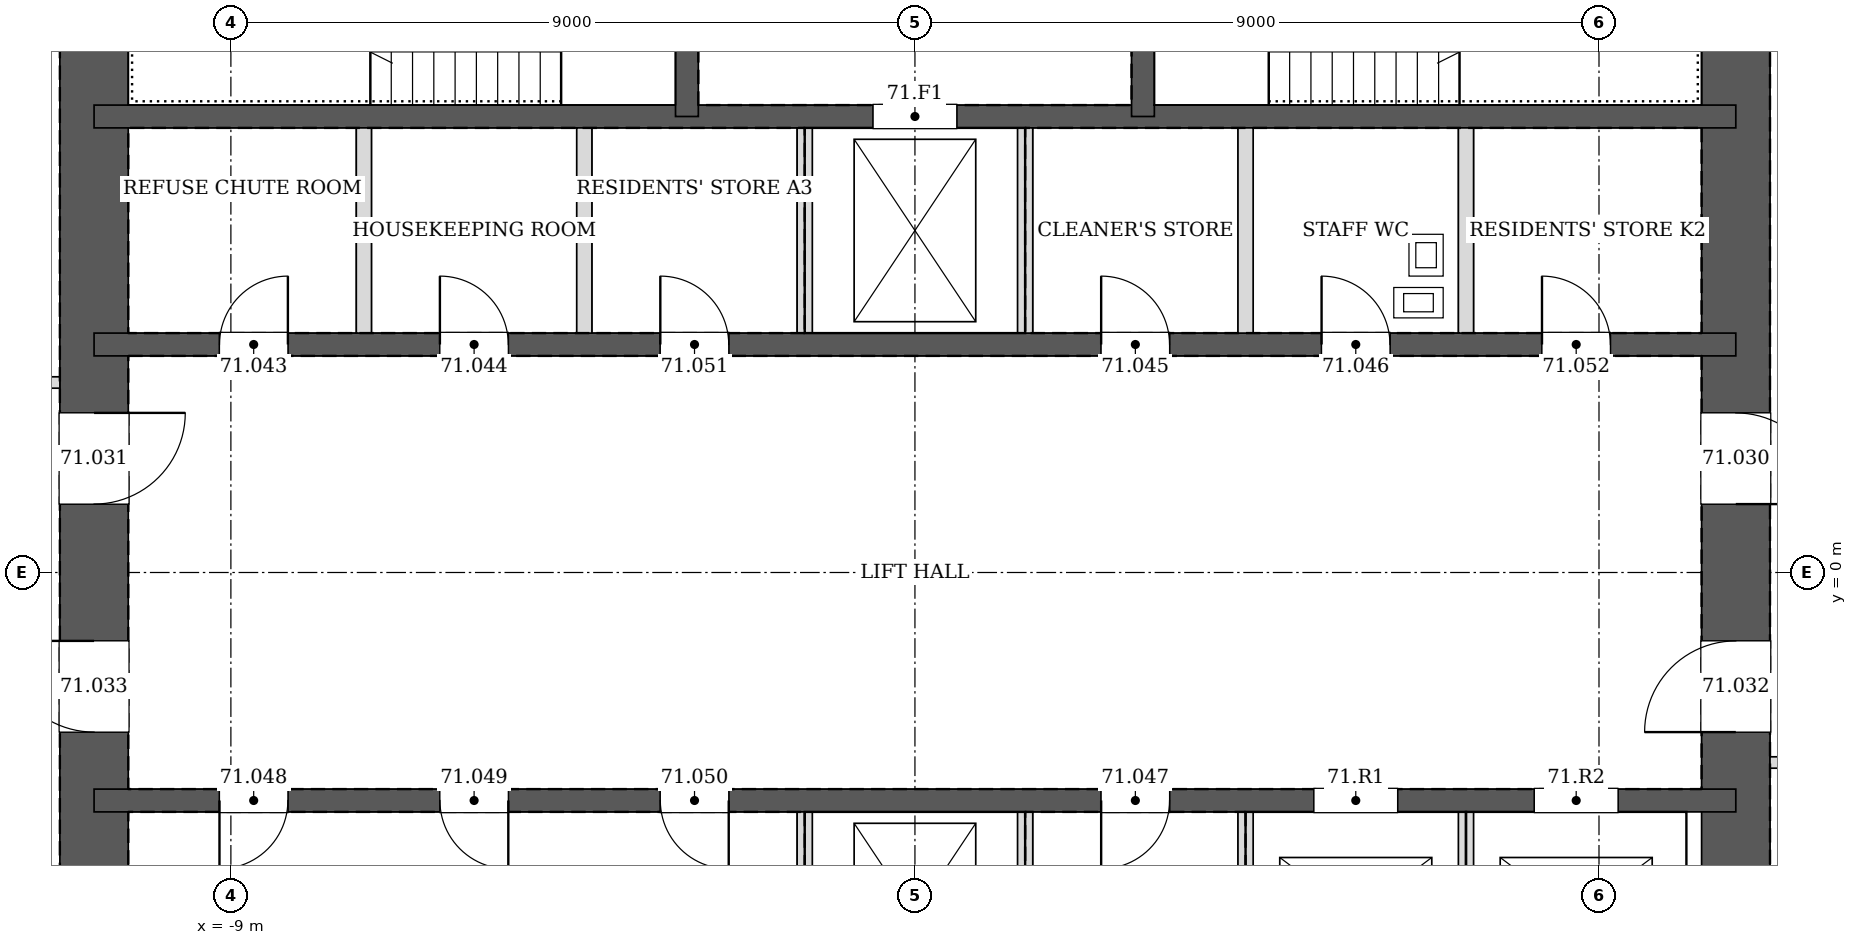
"""IFC4 building model, lengths in metres.
Left out: names, types, materials, properties, quantities, classifications, styles, units other than length and angle.
Written with IfcOpenShell. Run it as: python <this file> out.ifc"""

import sys

from ifc_helpers import new_model, si_unit, direction, frame, frame_2d, origin, place, context, subcontext, project, spatial, rectangle, extrude, element, fill, save


model = new_model("IFC4")
c1 = context("Model", 3, precision=1e-05, world=origin(), true_north=direction((0.0, 1.0)))
c2 = subcontext(c1, "Body", "Model", "MODEL_VIEW")
j1 = project(units=[si_unit("LENGTHUNIT", "METRE"), si_unit("PLANEANGLEUNIT", "RADIAN")], contexts=[c1])
p1 = place(None, origin())
s1 = spatial("IfcSite", under=j1, at=p1, CompositionType="ELEMENT")
p2 = place(p1, origin())
s2 = spatial("IfcBuilding", under=s1, at=p2, CompositionType="ELEMENT")
p3 = place(p2, frame((0.0, 0.0, 291.2)))
s3 = spatial("IfcBuildingStorey", under=s2, at=p3, CompositionType="ELEMENT", Elevation=291.2)
p4 = place(p3, frame((10.8, -10.8, 0.0), z_axis=(0.0, 0.0, 1.0), x_axis=(0.0, 1.0, 0.0)))
e1 = element("IfcWall", 1, at=p4, inside=s3, PredefinedType="SOLIDWALL", context=c2, shape_type="SweptSolid", body=[
    extrude(rectangle(XDim=21.6, YDim=0.9, at=frame_2d((10.8, 0.0))), origin(), (0.0, 0.0, 1.0), 3.4),
])
p5 = place(p4, frame((11.7, 0.0, 0.0)))
e2 = element("IfcOpeningElement", 2, at=p5, cuts=e1, PredefinedType="OPENING", context=c2, shape_type="SweptSolid", body=[
    extrude(rectangle(XDim=1.2, YDim=2.1, at=frame_2d((0.6, 1.05))), frame((0.0, 0.46, 0.0), z_axis=(0.0, -1.0, 0.0), x_axis=(1.0, 0.0, 0.0)), (0.0, 0.0, 1.0), 0.92),
])
p6 = place(p4, frame((8.7, 0.0, 0.0)))
e3 = element("IfcOpeningElement", 3, at=p6, cuts=e1, PredefinedType="OPENING", context=c2, shape_type="SweptSolid", body=[
    extrude(rectangle(XDim=1.2, YDim=2.1, at=frame_2d((0.6, 1.05))), frame((0.0, 0.46, 0.0), z_axis=(0.0, -1.0, 0.0), x_axis=(1.0, 0.0, 0.0)), (0.0, 0.0, 1.0), 0.92),
])
p7 = place(p3, frame((-10.8, 10.8, 0.0), z_axis=(0.0, 0.0, 1.0), x_axis=(0.0, -1.0, 0.0)))
e4 = element("IfcWall", 4, at=p7, inside=s3, PredefinedType="SOLIDWALL", context=c2, shape_type="SweptSolid", body=[
    extrude(rectangle(XDim=21.6, YDim=0.9, at=frame_2d((10.8, 0.0))), origin(), (0.0, 0.0, 1.0), 3.4),
])
p8 = place(p7, frame((8.7, 0.0, 0.0)))
e5 = element("IfcOpeningElement", 5, at=p8, cuts=e4, PredefinedType="OPENING", context=c2, shape_type="SweptSolid", body=[
    extrude(rectangle(XDim=1.2, YDim=2.1, at=frame_2d((0.6, 1.05))), frame((0.0, 0.46, 0.0), z_axis=(0.0, -1.0, 0.0), x_axis=(1.0, 0.0, 0.0)), (0.0, 0.0, 1.0), 0.92),
])
p9 = place(p7, frame((11.7, 0.0, 0.0)))
e6 = element("IfcOpeningElement", 6, at=p9, cuts=e4, PredefinedType="OPENING", context=c2, shape_type="SweptSolid", body=[
    extrude(rectangle(XDim=1.2, YDim=2.1, at=frame_2d((0.6, 1.05))), frame((0.0, 0.46, 0.0), z_axis=(0.0, -1.0, 0.0), x_axis=(1.0, 0.0, 0.0)), (0.0, 0.0, 1.0), 0.92),
])
p10 = place(p3, frame((-10.8, 3.0, 0.0), z_axis=(0.0, 0.0, 1.0), x_axis=(1.0, 0.0, 0.0)))
e7 = element("IfcWall", 7, at=p10, inside=s3, PredefinedType="SOLIDWALL", context=c2, shape_type="SweptSolid", body=[
    extrude(rectangle(XDim=21.6, YDim=0.3, at=frame_2d((10.8, 0.0))), origin(), (0.0, 0.0, 1.0), 3.4),
])
p11 = place(p10, frame((1.65, 0.0, 0.0)))
e8 = element("IfcOpeningElement", 8, at=p11, cuts=e7, PredefinedType="OPENING", context=c2, shape_type="SweptSolid", body=[
    extrude(rectangle(XDim=0.9, YDim=2.1, at=frame_2d((0.45, 1.05))), frame((0.0, 0.16, 0.0), z_axis=(0.0, -1.0, 0.0), x_axis=(1.0, 0.0, 0.0)), (0.0, 0.0, 1.0), 0.32),
])
p12 = place(p10, frame((4.55, 0.0, 0.0)))
e9 = element("IfcOpeningElement", 9, at=p12, cuts=e7, PredefinedType="OPENING", context=c2, shape_type="SweptSolid", body=[
    extrude(rectangle(XDim=0.9, YDim=2.1, at=frame_2d((0.45, 1.05))), frame((0.0, 0.16, 0.0), z_axis=(0.0, -1.0, 0.0), x_axis=(1.0, 0.0, 0.0)), (0.0, 0.0, 1.0), 0.32),
])
p13 = place(p10, frame((13.25, 0.0, 0.0)))
e10 = element("IfcOpeningElement", 10, at=p13, cuts=e7, PredefinedType="OPENING", context=c2, shape_type="SweptSolid", body=[
    extrude(rectangle(XDim=0.9, YDim=2.1, at=frame_2d((0.45, 1.05))), frame((0.0, 0.16, 0.0), z_axis=(0.0, -1.0, 0.0), x_axis=(1.0, 0.0, 0.0)), (0.0, 0.0, 1.0), 0.32),
])
p14 = place(p10, frame((16.15, 0.0, 0.0)))
e11 = element("IfcOpeningElement", 11, at=p14, cuts=e7, PredefinedType="OPENING", context=c2, shape_type="SweptSolid", body=[
    extrude(rectangle(XDim=0.9, YDim=2.1, at=frame_2d((0.45, 1.05))), frame((0.0, 0.16, 0.0), z_axis=(0.0, -1.0, 0.0), x_axis=(1.0, 0.0, 0.0)), (0.0, 0.0, 1.0), 0.32),
])
p15 = place(p10, frame((7.45, 0.0, 0.0)))
e12 = element("IfcOpeningElement", 12, at=p15, cuts=e7, PredefinedType="OPENING", context=c2, shape_type="SweptSolid", body=[
    extrude(rectangle(XDim=0.9, YDim=2.1, at=frame_2d((0.45, 1.05))), frame((0.0, 0.16, 0.0), z_axis=(0.0, -1.0, 0.0), x_axis=(1.0, 0.0, 0.0)), (0.0, 0.0, 1.0), 0.32),
])
p16 = place(p10, frame((19.05, 0.0, 0.0)))
e13 = element("IfcOpeningElement", 13, at=p16, cuts=e7, PredefinedType="OPENING", context=c2, shape_type="SweptSolid", body=[
    extrude(rectangle(XDim=0.9, YDim=2.1, at=frame_2d((0.45, 1.05))), frame((0.0, 0.16, 0.0), z_axis=(0.0, -1.0, 0.0), x_axis=(1.0, 0.0, 0.0)), (0.0, 0.0, 1.0), 0.32),
])
p17 = place(p3, frame((-10.8, 6.0, 0.0), z_axis=(0.0, 0.0, 1.0), x_axis=(1.0, 0.0, 0.0)))
e14 = element("IfcWall", 14, at=p17, inside=s3, PredefinedType="SOLIDWALL", context=c2, shape_type="SweptSolid", body=[
    extrude(rectangle(XDim=21.6, YDim=0.3, at=frame_2d((10.8, 0.0))), origin(), (0.0, 0.0, 1.0), 3.4),
])
p18 = place(p17, frame((10.25, 0.0, 0.0)))
e15 = element("IfcOpeningElement", 15, at=p18, cuts=e14, PredefinedType="OPENING", context=c2, shape_type="SweptSolid", body=[
    extrude(rectangle(XDim=1.1, YDim=2.1, at=frame_2d((0.55, 1.05))), frame((0.0, 0.16, 0.0), z_axis=(0.0, -1.0, 0.0), x_axis=(1.0, 0.0, 0.0)), (0.0, 0.0, 1.0), 0.32),
])
p19 = place(p3, frame((-3.0, 6.0, 0.0), z_axis=(0.0, 0.0, 1.0), x_axis=(0.0, 1.0, 0.0)))
e16 = element("IfcWall", 16, at=p19, inside=s3, PredefinedType="SOLIDWALL", context=c2, shape_type="SweptSolid", body=[
    extrude(rectangle(XDim=4.8, YDim=0.3, at=frame_2d((2.4, 0.0))), origin(), (0.0, 0.0, 1.0), 3.4),
])
p20 = place(p19, frame((1.75, 0.0, 0.0)))
e17 = element("IfcOpeningElement", 17, at=p20, cuts=e16, PredefinedType="OPENING", context=c2, shape_type="SweptSolid", body=[
    extrude(rectangle(XDim=1.0, YDim=2.1, at=frame_2d((0.5, 1.05))), frame((0.0, 0.16, 0.0), z_axis=(0.0, -1.0, 0.0), x_axis=(1.0, 0.0, 0.0)), (0.0, 0.0, 1.0), 0.32),
])
p21 = place(p3, frame((3.0, 6.0, 0.0), z_axis=(0.0, 0.0, 1.0), x_axis=(0.0, 1.0, 0.0)))
e18 = element("IfcWall", 18, at=p21, inside=s3, PredefinedType="SOLIDWALL", context=c2, shape_type="SweptSolid", body=[
    extrude(rectangle(XDim=4.8, YDim=0.3, at=frame_2d((2.4, 0.0))), origin(), (0.0, 0.0, 1.0), 3.4),
])
p22 = place(p21, frame((1.75, 0.0, 0.0)))
e19 = element("IfcOpeningElement", 19, at=p22, cuts=e18, PredefinedType="OPENING", context=c2, shape_type="SweptSolid", body=[
    extrude(rectangle(XDim=1.0, YDim=2.1, at=frame_2d((0.5, 1.05))), frame((0.0, 0.16, 0.0), z_axis=(0.0, -1.0, 0.0), x_axis=(1.0, 0.0, 0.0)), (0.0, 0.0, 1.0), 0.32),
])
p23 = place(p3, frame((-10.8, -3.0, 0.0), z_axis=(0.0, 0.0, 1.0), x_axis=(1.0, 0.0, 0.0)))
e20 = element("IfcWall", 20, at=p23, inside=s3, PredefinedType="SOLIDWALL", context=c2, shape_type="SweptSolid", body=[
    extrude(rectangle(XDim=21.6, YDim=0.3, at=frame_2d((10.8, 0.0))), origin(), (0.0, 0.0, 1.0), 3.4),
])
p24 = place(p23, frame((13.25, 0.0, 0.0)))
e21 = element("IfcOpeningElement", 21, at=p24, cuts=e20, PredefinedType="OPENING", context=c2, shape_type="SweptSolid", body=[
    extrude(rectangle(XDim=0.9, YDim=2.1, at=frame_2d((0.45, 1.05))), frame((0.0, 0.16, 0.0), z_axis=(0.0, -1.0, 0.0), x_axis=(1.0, 0.0, 0.0)), (0.0, 0.0, 1.0), 0.32),
])
p25 = place(p23, frame((1.65, 0.0, 0.0)))
e22 = element("IfcOpeningElement", 22, at=p25, cuts=e20, PredefinedType="OPENING", context=c2, shape_type="SweptSolid", body=[
    extrude(rectangle(XDim=0.9, YDim=2.1, at=frame_2d((0.45, 1.05))), frame((0.0, 0.16, 0.0), z_axis=(0.0, -1.0, 0.0), x_axis=(1.0, 0.0, 0.0)), (0.0, 0.0, 1.0), 0.32),
])
p26 = place(p23, frame((4.55, 0.0, 0.0)))
e23 = element("IfcOpeningElement", 23, at=p26, cuts=e20, PredefinedType="OPENING", context=c2, shape_type="SweptSolid", body=[
    extrude(rectangle(XDim=0.9, YDim=2.1, at=frame_2d((0.45, 1.05))), frame((0.0, 0.16, 0.0), z_axis=(0.0, -1.0, 0.0), x_axis=(1.0, 0.0, 0.0)), (0.0, 0.0, 1.0), 0.32),
])
p27 = place(p23, frame((7.45, 0.0, 0.0)))
e24 = element("IfcOpeningElement", 24, at=p27, cuts=e20, PredefinedType="OPENING", context=c2, shape_type="SweptSolid", body=[
    extrude(rectangle(XDim=0.9, YDim=2.1, at=frame_2d((0.45, 1.05))), frame((0.0, 0.16, 0.0), z_axis=(0.0, -1.0, 0.0), x_axis=(1.0, 0.0, 0.0)), (0.0, 0.0, 1.0), 0.32),
])
p28 = place(p23, frame((16.05, 0.0, 0.0)))
e25 = element("IfcOpeningElement", 25, at=p28, cuts=e20, PredefinedType="OPENING", context=c2, shape_type="SweptSolid", body=[
    extrude(rectangle(XDim=1.1, YDim=2.1, at=frame_2d((0.55, 1.05))), frame((0.0, 0.16, 0.0), z_axis=(0.0, -1.0, 0.0), x_axis=(1.0, 0.0, 0.0)), (0.0, 0.0, 1.0), 0.32),
])
p29 = place(p23, frame((18.95, 0.0, 0.0)))
e26 = element("IfcOpeningElement", 26, at=p29, cuts=e20, PredefinedType="OPENING", context=c2, shape_type="SweptSolid", body=[
    extrude(rectangle(XDim=1.1, YDim=2.1, at=frame_2d((0.55, 1.05))), frame((0.0, 0.16, 0.0), z_axis=(0.0, -1.0, 0.0), x_axis=(1.0, 0.0, 0.0)), (0.0, 0.0, 1.0), 0.32),
])
p30 = place(p3, frame((11.25, -2.5, 0.0), z_axis=(0.0, 0.0, 1.0), x_axis=(1.0, 0.0, 0.0)))
e27 = element("IfcWall", 27, at=p30, inside=s3, PredefinedType="PARTITIONING", context=c2, shape_type="SweptSolid", body=[
    extrude(rectangle(XDim=1.65, YDim=0.15, at=frame_2d((0.825, 0.0))), origin(), (0.0, 0.0, 1.0), 3.2),
])
p31 = place(p30, frame((0.35, 0.0, 0.0)))
e28 = element("IfcOpeningElement", 28, at=p31, cuts=e27, PredefinedType="OPENING", context=c2, shape_type="SweptSolid", body=[
    extrude(rectangle(XDim=0.95, YDim=2.1, at=frame_2d((0.475, 1.05))), frame((0.0, 0.085, 0.0), z_axis=(0.0, -1.0, 0.0), x_axis=(1.0, 0.0, 0.0)), (0.0, 0.0, 1.0), 0.17),
])
p32 = place(p3, frame((-11.25, 2.5, 0.0), z_axis=(0.0, 0.0, 1.0), x_axis=(-1.0, 0.0, 0.0)))
e29 = element("IfcWall", 29, at=p32, inside=s3, PredefinedType="PARTITIONING", context=c2, shape_type="SweptSolid", body=[
    extrude(rectangle(XDim=1.65, YDim=0.15, at=frame_2d((0.825, 0.0))), origin(), (0.0, 0.0, 1.0), 3.2),
])
p33 = place(p32, frame((0.35, 0.0, 0.0)))
e30 = element("IfcOpeningElement", 30, at=p33, cuts=e29, PredefinedType="OPENING", context=c2, shape_type="SweptSolid", body=[
    extrude(rectangle(XDim=0.95, YDim=2.1, at=frame_2d((0.475, 1.05))), frame((0.0, 0.085, 0.0), z_axis=(0.0, -1.0, 0.0), x_axis=(1.0, 0.0, 0.0)), (0.0, 0.0, 1.0), 0.17),
])
for number, where, z_axis, x_axis in (
    (31, (-7.25, 3.15, 0.0), (0.0, 0.0, 1.0), (0.0, 1.0, 0.0)),
    (32, (-4.35, 3.15, 0.0), (0.0, 0.0, 1.0), (0.0, 1.0, 0.0)),
    (33, (-1.45, 3.15, 0.0), (0.0, 0.0, 1.0), (0.0, 1.0, 0.0)),
    (34, (1.45, 3.15, 0.0), (0.0, 0.0, 1.0), (0.0, 1.0, 0.0)),
    (35, (4.35, 3.15, 0.0), (0.0, 0.0, 1.0), (0.0, 1.0, 0.0)),
    (36, (7.25, 3.15, 0.0), (0.0, 0.0, 1.0), (0.0, 1.0, 0.0)),
    (37, (-1.45, -5.85, 0.0), (0.0, 0.0, 1.0), (0.0, 1.0, 0.0)),
    (38, (1.45, -5.85, 0.0), (0.0, 0.0, 1.0), (0.0, 1.0, 0.0)),
    (39, (4.35, -5.85, 0.0), (0.0, 0.0, 1.0), (0.0, 1.0, 0.0)),
):
    element("IfcWall", number, at=place(p3, frame(where, z_axis=z_axis, x_axis=x_axis)), inside=s3, PredefinedType="PARTITIONING", context=c2, shape_type="SweptSolid", body=[
        extrude(rectangle(XDim=2.7, YDim=0.2, at=frame_2d((1.35, 0.0))), origin(), (0.0, 0.0, 1.0), 3.2),
    ])
p34 = place(p3, frame((7.25, -5.85, 0.0), z_axis=(0.0, 0.0, 1.0), x_axis=(0.0, 1.0, 0.0)))
e40 = element("IfcWall", 40, at=p34, inside=s3, PredefinedType="PARTITIONING", context=c2, shape_type="SweptSolid", body=[
    extrude(rectangle(XDim=2.7, YDim=0.2, at=frame_2d((1.35, 0.0))), origin(), (0.0, 0.0, 1.0), 3.4),
])
p35 = place(p5, frame((1.2, 0.0, 0.0), z_axis=(0.0, 0.0, 1.0), x_axis=(-1.0, 0.0, 0.0)))
e41 = element("IfcDoor", 41, at=p35, inside=s3, OperationType="SINGLE_SWING_RIGHT", PredefinedType="DOOR", context=c2, shape_type="SweptSolid", body=[
    extrude(rectangle(XDim=1.2, YDim=2.1, at=frame_2d((0.6, 1.05))), frame((0.0, 0.025, 0.0), z_axis=(0.0, -1.0, 0.0), x_axis=(1.0, 0.0, 0.0)), (0.0, 0.0, 1.0), 0.05),
])
fill(e2, e41)
p36 = place(p8, origin())
e42 = element("IfcDoor", 42, at=p36, inside=s3, OperationType="SINGLE_SWING_LEFT", PredefinedType="DOOR", context=c2, shape_type="SweptSolid", body=[
    extrude(rectangle(XDim=1.2, YDim=2.1, at=frame_2d((0.6, 1.05))), frame((0.0, 0.025, 0.0), z_axis=(0.0, -1.0, 0.0), x_axis=(1.0, 0.0, 0.0)), (0.0, 0.0, 1.0), 0.05),
])
fill(e5, e42)
p37 = place(p6, origin())
e43 = element("IfcDoor", 43, at=p37, inside=s3, OperationType="SINGLE_SWING_LEFT", PredefinedType="DOOR", context=c2, shape_type="SweptSolid", body=[
    extrude(rectangle(XDim=1.2, YDim=2.1, at=frame_2d((0.6, 1.05))), frame((0.0, 0.025, 0.0), z_axis=(0.0, -1.0, 0.0), x_axis=(1.0, 0.0, 0.0)), (0.0, 0.0, 1.0), 0.05),
])
fill(e3, e43)
p38 = place(p9, frame((1.2, 0.0, 0.0), z_axis=(0.0, 0.0, 1.0), x_axis=(-1.0, 0.0, 0.0)))
e44 = element("IfcDoor", 44, at=p38, inside=s3, OperationType="SINGLE_SWING_RIGHT", PredefinedType="DOOR", context=c2, shape_type="SweptSolid", body=[
    extrude(rectangle(XDim=1.2, YDim=2.1, at=frame_2d((0.6, 1.05))), frame((0.0, 0.025, 0.0), z_axis=(0.0, -1.0, 0.0), x_axis=(1.0, 0.0, 0.0)), (0.0, 0.0, 1.0), 0.05),
])
fill(e6, e44)
p39 = place(p11, origin())
e45 = element("IfcDoor", 45, at=p39, inside=s3, OperationType="SINGLE_SWING_RIGHT", PredefinedType="DOOR", context=c2, shape_type="SweptSolid", body=[
    extrude(rectangle(XDim=0.9, YDim=2.1, at=frame_2d((0.45, 1.05))), frame((0.0, 0.025, 0.0), z_axis=(0.0, -1.0, 0.0), x_axis=(1.0, 0.0, 0.0)), (0.0, 0.0, 1.0), 0.05),
])
fill(e8, e45)
p40 = place(p12, origin())
e46 = element("IfcDoor", 46, at=p40, inside=s3, OperationType="SINGLE_SWING_LEFT", PredefinedType="DOOR", context=c2, shape_type="SweptSolid", body=[
    extrude(rectangle(XDim=0.9, YDim=2.1, at=frame_2d((0.45, 1.05))), frame((0.0, 0.025, 0.0), z_axis=(0.0, -1.0, 0.0), x_axis=(1.0, 0.0, 0.0)), (0.0, 0.0, 1.0), 0.05),
])
fill(e9, e46)
p41 = place(p13, origin())
e47 = element("IfcDoor", 47, at=p41, inside=s3, OperationType="SINGLE_SWING_LEFT", PredefinedType="DOOR", context=c2, shape_type="SweptSolid", body=[
    extrude(rectangle(XDim=0.9, YDim=2.1, at=frame_2d((0.45, 1.05))), frame((0.0, 0.025, 0.0), z_axis=(0.0, -1.0, 0.0), x_axis=(1.0, 0.0, 0.0)), (0.0, 0.0, 1.0), 0.05),
])
fill(e10, e47)
p42 = place(p14, origin())
e48 = element("IfcDoor", 48, at=p42, inside=s3, OperationType="SINGLE_SWING_LEFT", PredefinedType="DOOR", context=c2, shape_type="SweptSolid", body=[
    extrude(rectangle(XDim=0.9, YDim=2.1, at=frame_2d((0.45, 1.05))), frame((0.0, 0.025, 0.0), z_axis=(0.0, -1.0, 0.0), x_axis=(1.0, 0.0, 0.0)), (0.0, 0.0, 1.0), 0.05),
])
fill(e11, e48)
p43 = place(p24, frame((0.9, 0.0, 0.0), z_axis=(0.0, 0.0, 1.0), x_axis=(-1.0, 0.0, 0.0)))
e49 = element("IfcDoor", 49, at=p43, inside=s3, OperationType="SINGLE_SWING_RIGHT", PredefinedType="DOOR", context=c2, shape_type="SweptSolid", body=[
    extrude(rectangle(XDim=0.9, YDim=2.1, at=frame_2d((0.45, 1.05))), frame((0.0, 0.025, 0.0), z_axis=(0.0, -1.0, 0.0), x_axis=(1.0, 0.0, 0.0)), (0.0, 0.0, 1.0), 0.05),
])
fill(e21, e49)
p44 = place(p25, frame((0.9, 0.0, 0.0), z_axis=(0.0, 0.0, 1.0), x_axis=(-1.0, 0.0, 0.0)))
e50 = element("IfcDoor", 50, at=p44, inside=s3, OperationType="SINGLE_SWING_RIGHT", PredefinedType="DOOR", context=c2, shape_type="SweptSolid", body=[
    extrude(rectangle(XDim=0.9, YDim=2.1, at=frame_2d((0.45, 1.05))), frame((0.0, 0.025, 0.0), z_axis=(0.0, -1.0, 0.0), x_axis=(1.0, 0.0, 0.0)), (0.0, 0.0, 1.0), 0.05),
])
fill(e22, e50)
p45 = place(p26, frame((0.9, 0.0, 0.0), z_axis=(0.0, 0.0, 1.0), x_axis=(-1.0, 0.0, 0.0)))
e51 = element("IfcDoor", 51, at=p45, inside=s3, OperationType="SINGLE_SWING_LEFT", PredefinedType="DOOR", context=c2, shape_type="SweptSolid", body=[
    extrude(rectangle(XDim=0.9, YDim=2.1, at=frame_2d((0.45, 1.05))), frame((0.0, 0.025, 0.0), z_axis=(0.0, -1.0, 0.0), x_axis=(1.0, 0.0, 0.0)), (0.0, 0.0, 1.0), 0.05),
])
fill(e23, e51)
p46 = place(p27, frame((0.9, 0.0, 0.0), z_axis=(0.0, 0.0, 1.0), x_axis=(-1.0, 0.0, 0.0)))
e52 = element("IfcDoor", 52, at=p46, inside=s3, OperationType="SINGLE_SWING_LEFT", PredefinedType="DOOR", context=c2, shape_type="SweptSolid", body=[
    extrude(rectangle(XDim=0.9, YDim=2.1, at=frame_2d((0.45, 1.05))), frame((0.0, 0.025, 0.0), z_axis=(0.0, -1.0, 0.0), x_axis=(1.0, 0.0, 0.0)), (0.0, 0.0, 1.0), 0.05),
])
fill(e24, e52)
p47 = place(p15, origin())
e53 = element("IfcDoor", 53, at=p47, inside=s3, OperationType="SINGLE_SWING_LEFT", PredefinedType="DOOR", context=c2, shape_type="SweptSolid", body=[
    extrude(rectangle(XDim=0.9, YDim=2.1, at=frame_2d((0.45, 1.05))), frame((0.0, 0.025, 0.0), z_axis=(0.0, -1.0, 0.0), x_axis=(1.0, 0.0, 0.0)), (0.0, 0.0, 1.0), 0.05),
])
fill(e12, e53)
p48 = place(p16, origin())
e54 = element("IfcDoor", 54, at=p48, inside=s3, OperationType="SINGLE_SWING_LEFT", PredefinedType="DOOR", context=c2, shape_type="SweptSolid", body=[
    extrude(rectangle(XDim=0.9, YDim=2.1, at=frame_2d((0.45, 1.05))), frame((0.0, 0.025, 0.0), z_axis=(0.0, -1.0, 0.0), x_axis=(1.0, 0.0, 0.0)), (0.0, 0.0, 1.0), 0.05),
])
fill(e13, e54)
p49 = place(p18, origin())
e55 = element("IfcDoor", 55, at=p49, inside=s3, OperationType="DOUBLE_DOOR_SLIDING", PredefinedType="DOOR", context=c2, shape_type="SweptSolid", body=[
    extrude(rectangle(XDim=1.1, YDim=2.1, at=frame_2d((0.55, 1.05))), frame((0.0, 0.025, 0.0), z_axis=(0.0, -1.0, 0.0), x_axis=(1.0, 0.0, 0.0)), (0.0, 0.0, 1.0), 0.05),
])
fill(e15, e55)
p50 = place(p28, origin())
e56 = element("IfcDoor", 56, at=p50, inside=s3, OperationType="DOUBLE_DOOR_SLIDING", PredefinedType="DOOR", context=c2, shape_type="SweptSolid", body=[
    extrude(rectangle(XDim=1.1, YDim=2.1, at=frame_2d((0.55, 1.05))), frame((0.0, 0.025, 0.0), z_axis=(0.0, -1.0, 0.0), x_axis=(1.0, 0.0, 0.0)), (0.0, 0.0, 1.0), 0.05),
])
fill(e25, e56)
p51 = place(p29, origin())
e57 = element("IfcDoor", 57, at=p51, inside=s3, OperationType="DOUBLE_DOOR_SLIDING", PredefinedType="DOOR", context=c2, shape_type="SweptSolid", body=[
    extrude(rectangle(XDim=1.1, YDim=2.1, at=frame_2d((0.55, 1.05))), frame((0.0, 0.025, 0.0), z_axis=(0.0, -1.0, 0.0), x_axis=(1.0, 0.0, 0.0)), (0.0, 0.0, 1.0), 0.05),
])
fill(e26, e57)
save(model, sys.argv[1])
